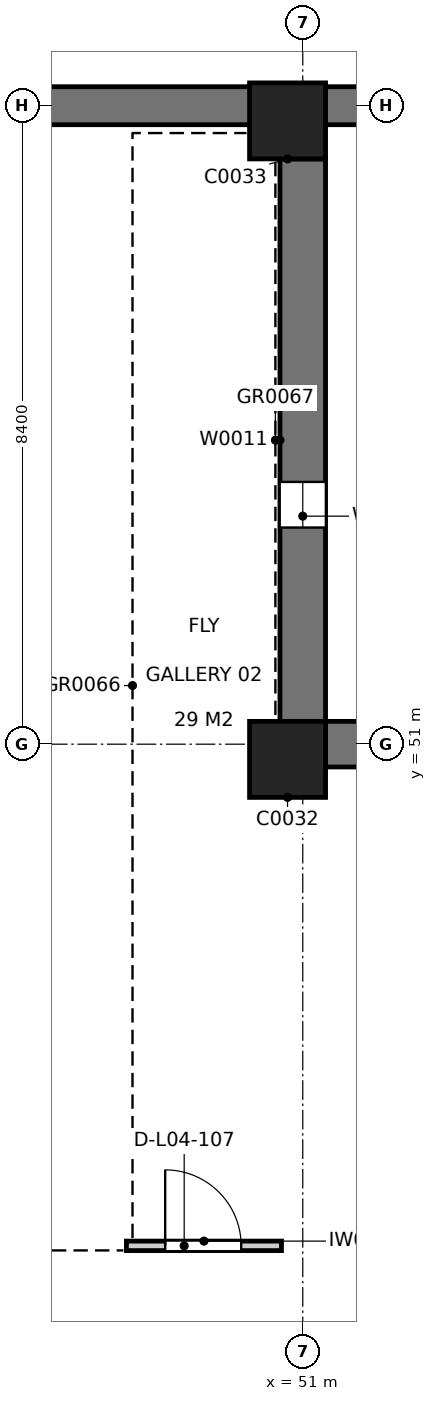
"""IFC4 building model, lengths in metres.
Left out: names, types, materials, properties, quantities, classifications, styles, units other than length and angle.
Written with IfcOpenShell. Run it as: python <this file> out.ifc"""

import sys

from ifc_helpers import new_model, si_unit, direction, frame, frame_2d, origin, origin_2d, place, context, subcontext, project, spatial, rectangle, extrude, element, fill, save


model = new_model("IFC4")
c1 = context("Model", 3, precision=1e-05, world=origin(), true_north=direction((0.0, 1.0)))
c2 = subcontext(c1, "Body", "Model", "MODEL_VIEW")
j1 = project(units=[si_unit("LENGTHUNIT", "METRE"), si_unit("PLANEANGLEUNIT", "RADIAN")], contexts=[c1])
p1 = place(None, origin())
s1 = spatial("IfcSite", under=j1, at=p1, CompositionType="ELEMENT")
p2 = place(p1, origin())
s2 = spatial("IfcBuilding", under=s1, at=p2, CompositionType="ELEMENT")
p3 = place(p2, frame((0.0, 0.0, 19.2)))
s3 = spatial("IfcBuildingStorey", under=s2, at=p3, CompositionType="ELEMENT", Elevation=19.2)
p4 = place(p3, frame((26.153, 59.4, 0.0), z_axis=(0.0, 0.0, 1.0), x_axis=(1.0, 0.0, 0.0)))
e1 = element("IfcWall", 1, at=p4, inside=s3, PredefinedType="SOLIDWALL", context=c2, shape_type="SweptSolid", body=[
    extrude(rectangle(XDim=32.894, YDim=0.5, at=frame_2d((16.447, 0.0))), origin(), (0.0, 0.0, 1.0), 4.8),
])
for number, where, z_axis, x_axis in (
    (2, (50.8, 50.8, 0.0), (0.0, 0.0, 1.0), (1.0, 0.0, 0.0)),
    (3, (50.8, 59.2, 0.0), (0.0, 0.0, 1.0), (1.0, 0.0, 0.0)),
):
    element("IfcColumn", number, at=place(p3, frame(where, z_axis=z_axis, x_axis=x_axis)), inside=s3, PredefinedType="COLUMN", context=c2, shape_type="SweptSolid", body=[
        extrude(rectangle(XDim=1.0, YDim=1.0, at=origin_2d()), origin(), (0.0, 0.0, 1.0), 4.8),
    ])
p5 = place(p3, frame((58.7, 51.0, 0.0), z_axis=(0.0, 0.0, 1.0), x_axis=(-1.0, 0.0, 0.0)))
e4 = element("IfcWall", 4, at=p5, inside=s3, PredefinedType="SOLIDWALL", context=c2, shape_type="SweptSolid", body=[
    extrude(rectangle(XDim=7.4, YDim=0.6, at=frame_2d((3.7, 0.0))), origin(), (0.0, 0.0, 1.0), 4.8),
])
p6 = place(p5, frame((4.25, 0.0, 1.5)))
e5 = element("IfcOpeningElement", 5, at=p6, cuts=e4, PredefinedType="OPENING", context=c2, shape_type="SweptSolid", body=[
    extrude(rectangle(XDim=0.6, YDim=1.8, at=frame_2d((0.3, 0.9))), frame((0.0, 0.31, 0.0), z_axis=(0.0, -1.0, 0.0), x_axis=(1.0, 0.0, 0.0)), (0.0, 0.0, 1.0), 0.62),
])
p7 = place(p3, frame((51.0, 51.3, 0.0), z_axis=(0.0, 0.0, 1.0), x_axis=(0.0, 1.0, 0.0)))
e6 = element("IfcWall", 6, at=p7, inside=s3, PredefinedType="SOLIDWALL", context=c2, shape_type="SweptSolid", body=[
    extrude(rectangle(XDim=7.4, YDim=0.6, at=frame_2d((3.7, 0.0))), origin(), (0.0, 0.0, 1.0), 4.8),
])
p8 = place(p7, frame((2.55, 0.0, 1.5)))
e7 = element("IfcOpeningElement", 7, at=p8, cuts=e6, PredefinedType="OPENING", context=c2, shape_type="SweptSolid", body=[
    extrude(rectangle(XDim=0.6, YDim=1.8, at=frame_2d((0.3, 0.9))), frame((0.0, 0.31, 0.0), z_axis=(0.0, -1.0, 0.0), x_axis=(1.0, 0.0, 0.0)), (0.0, 0.0, 1.0), 0.62),
])
p9 = place(p3, frame((48.68, 44.4, 0.0), z_axis=(0.0, 0.0, 1.0), x_axis=(1.0, 0.0, 0.0)))
e8 = element("IfcWall", 8, at=p9, inside=s3, PredefinedType="PARTITIONING", context=c2, shape_type="SweptSolid", body=[
    extrude(rectangle(XDim=2.04, YDim=0.125, at=frame_2d((1.02, 0.0))), origin(), (0.0, 0.0, 1.0), 4.52),
])
p10 = place(p9, frame((0.51, 0.0, 0.0)))
e9 = element("IfcOpeningElement", 9, at=p10, cuts=e8, PredefinedType="OPENING", context=c2, shape_type="SweptSolid", body=[
    extrude(rectangle(XDim=1.0, YDim=2.1, at=frame_2d((0.5, 1.05))), frame((0.0, 0.073, 0.0), z_axis=(0.0, -1.0, 0.0), x_axis=(1.0, 0.0, 0.0)), (0.0, 0.0, 1.0), 0.145),
])
p11 = place(p10, origin())
e10 = element("IfcDoor", 10, at=p11, inside=s3, OperationType="SINGLE_SWING_LEFT", PredefinedType="DOOR", context=c2, shape_type="SweptSolid", body=[
    extrude(rectangle(XDim=1.0, YDim=2.1, at=frame_2d((0.5, 1.05))), frame((0.0, 0.025, 0.0), z_axis=(0.0, -1.0, 0.0), x_axis=(1.0, 0.0, 0.0)), (0.0, 0.0, 1.0), 0.05),
])
fill(e9, e10)
p12 = place(p8, origin())
e11 = element("IfcWindow", 11, at=p12, inside=s3, PartitioningType="SINGLE_PANEL", PredefinedType="WINDOW", context=c2, shape_type="SweptSolid", body=[
    extrude(rectangle(XDim=0.6, YDim=1.8, at=frame_2d((0.3, 0.9))), frame((0.0, 0.01, 0.0), z_axis=(0.0, -1.0, 0.0), x_axis=(1.0, 0.0, 0.0)), (0.0, 0.0, 1.0), 0.06),
])
fill(e7, e11)
save(model, sys.argv[1])
